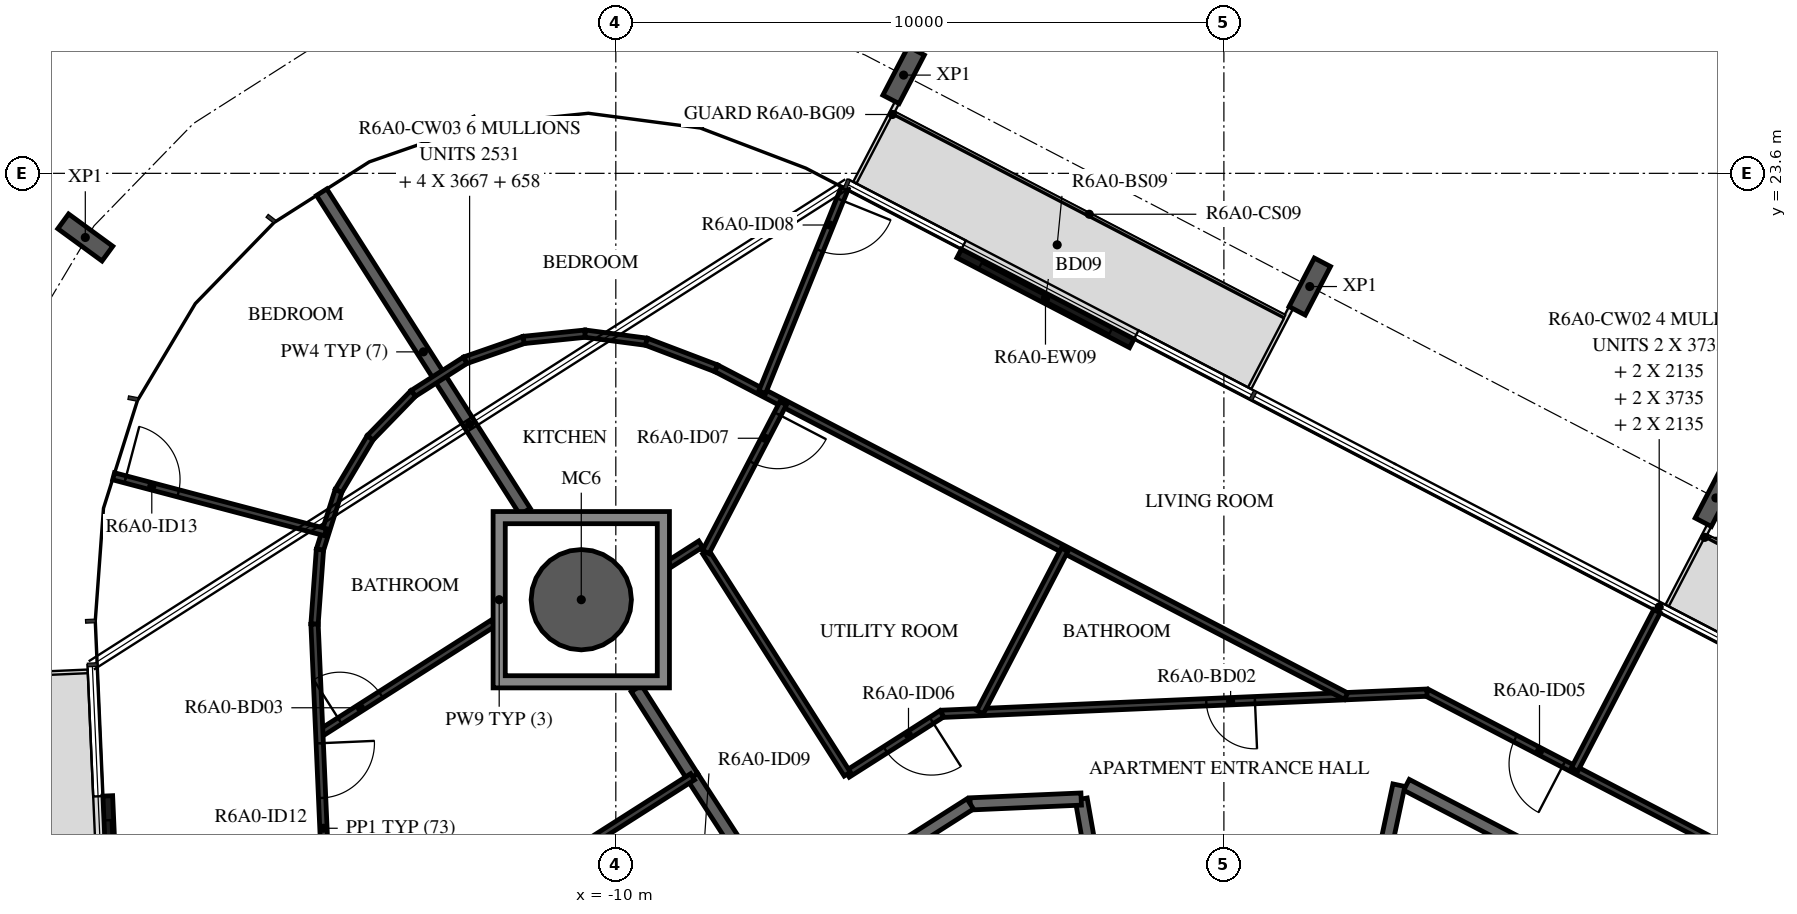
"""IFC4 building model, lengths in metres.
Left out: names, types, materials, properties, quantities, classifications, styles, units other than length and angle.
Written with IfcOpenShell. Run it as: python <this file> out.ifc"""

import sys

from ifc_helpers import new_model, si_unit, direction, frame, frame_2d, origin, origin_2d, place, context, subcontext, project, spatial, polyline, rectangle, hollow_circle, i_section, outline, extrude, element, fill, save


model = new_model("IFC4")
c1 = context("Model", 3, precision=1e-05, world=origin(), true_north=direction((0.0, 1.0)))
c2 = subcontext(c1, "Body", "Model", "MODEL_VIEW")
j1 = project(units=[si_unit("LENGTHUNIT", "METRE"), si_unit("PLANEANGLEUNIT", "RADIAN")], contexts=[c1])
p1 = place(None, origin())
s1 = spatial("IfcSite", under=j1, at=p1, CompositionType="ELEMENT")
p2 = place(p1, origin())
s2 = spatial("IfcBuilding", under=s1, at=p2, CompositionType="ELEMENT")
p3 = place(p2, frame((0.0, 0.0, 233.7)))
s3 = spatial("IfcBuildingStorey", under=s2, at=p3, CompositionType="ELEMENT", Elevation=233.7)
p4 = place(p3, frame((-10.568, 16.588, -0.38), z_axis=(0.0, 0.0, 1.0), x_axis=(1.0, 0.0, 0.0)))
e1 = element("IfcColumn", 1, at=p4, inside=s3, PredefinedType="COLUMN", context=c2, shape_type="SweptSolid", body=[
    extrude(hollow_circle(Radius=0.825, WallThickness=0.04, at=origin_2d()), origin(), (0.0, 0.0, 1.0), 3.5),
])
for number, where, z_axis, x_axis in (
    (2, (8.091, 18.261, -0.38), (0.0, 0.0, 1.0), (0.887, -0.462, 0.0)),
    (3, (1.412, 21.739, -0.38), (0.0, 0.0, 1.0), (0.887, -0.462, 0.0)),
    (4, (-5.267, 25.216, -0.38), (0.0, 0.0, 1.0), (0.887, -0.462, 0.0)),
    (5, (-18.724, 22.545, -0.38), (0.0, 0.0, 1.0), (0.59, 0.808, 0.0)),
):
    element("IfcColumn", number, at=place(p3, frame(where, z_axis=z_axis, x_axis=x_axis)), inside=s3, PredefinedType="COLUMN", context=c2, shape_type="SweptSolid", body=[
        extrude(i_section(OverallWidth=0.3, OverallDepth=0.9, WebThickness=0.019, FlangeThickness=0.035, FilletRadius=0.03, at=origin_2d()), origin(), (0.0, 0.0, 1.0), 3.5),
    ])
p5 = place(p3, frame((-1.515, 20.804, 0.0), z_axis=(0.0, 0.0, 1.0), x_axis=(-0.887014349583, 0.461741858221, 0.0)))
e6 = element("IfcWall", 6, at=p5, inside=s3, PredefinedType="STANDARD", context=c2, shape_type="SweptSolid", body=[
    extrude(rectangle(XDim=3.2, YDim=0.16, at=frame_2d((1.6, 0.0))), origin(), (0.0, 0.0, 1.0), 3.12),
])
p6 = place(p5, frame((0.4, 0.0, 0.0)))
e7 = element("IfcOpeningElement", 7, at=p6, cuts=e6, PredefinedType="OPENING", context=c2, shape_type="SweptSolid", body=[
    extrude(rectangle(XDim=2.4, YDim=2.4, at=frame_2d((1.2, 1.2))), frame((0.0, 0.09, 0.0), z_axis=(0.0, -1.0, 0.0), x_axis=(1.0, 0.0, 0.0)), (0.0, 0.0, 1.0), 0.18),
])
p7 = place(p3, frame((-18.355, 13.362, 0.0), z_axis=(0.0, 0.0, 1.0), x_axis=(0.043639181999, -0.999047357133, 0.0)))
e8 = element("IfcWall", 8, at=p7, inside=s3, PredefinedType="STANDARD", context=c2, shape_type="SweptSolid", body=[
    extrude(rectangle(XDim=3.2, YDim=0.16, at=frame_2d((1.6, 0.0))), origin(), (0.0, 0.0, 1.0), 3.12),
])
p8 = place(p7, frame((0.4, 0.0, 0.0)))
e9 = element("IfcOpeningElement", 9, at=p8, cuts=e8, PredefinedType="OPENING", context=c2, shape_type="SweptSolid", body=[
    extrude(rectangle(XDim=2.4, YDim=2.4, at=frame_2d((1.2, 1.2))), frame((0.0, 0.09, 0.0), z_axis=(0.0, -1.0, 0.0), x_axis=(1.0, 0.0, 0.0)), (0.0, 0.0, 1.0), 0.18),
])
p9 = place(p3, frame((9.372, 10.228, 0.0), z_axis=(0.0, 0.0, 1.0), x_axis=(-0.887005184532, 0.461759464021, 0.0)))
e10 = element("IfcWall", 10, at=p9, inside=s3, PredefinedType="STANDARD", context=c2, shape_type="SweptSolid", body=[
    extrude(rectangle(XDim=7.181, YDim=0.2, at=frame_2d((3.591, 0.0))), origin(), (0.0, 0.0, 1.0), 3.12),
])
p10 = place(p3, frame((2.878, 13.538, 0.0), z_axis=(0.0, 0.0, 1.0), x_axis=(-0.207893604596, -0.978151444904, 0.0)))
e11 = element("IfcWall", 11, at=p10, inside=s3, PredefinedType="STANDARD", context=c2, shape_type="SweptSolid", body=[
    extrude(rectangle(XDim=1.927, YDim=0.2, at=frame_2d((0.963, 0.0))), origin(), (0.0, 0.0, 1.0), 3.12),
])
p11 = place(p3, frame((-2.074, 11.761, 0.0), z_axis=(0.0, 0.0, 1.0), x_axis=(-0.173679082312, 0.984802303189, 0.0)))
e12 = element("IfcWall", 12, at=p11, inside=s3, PredefinedType="STANDARD", context=c2, shape_type="SweptSolid", body=[
    extrude(rectangle(XDim=1.573, YDim=0.2, at=frame_2d((0.787, 0.0))), origin(), (0.0, 0.0, 1.0), 3.12),
])
p12 = place(p3, frame((-2.347, 13.31, 0.0), z_axis=(0.0, 0.0, 1.0), x_axis=(-0.999050095671, -0.043576442492, 0.0)))
e13 = element("IfcWall", 13, at=p12, inside=s3, PredefinedType="STANDARD", context=c2, shape_type="SweptSolid", body=[
    extrude(rectangle(XDim=1.826, YDim=0.2, at=frame_2d((0.913, 0.0))), origin(), (0.0, 0.0, 1.0), 3.12),
])
p13 = place(p3, frame((-4.172, 13.231, 0.0), z_axis=(0.0, 0.0, 1.0), x_axis=(-0.843388394728, -0.537304397561, 0.0)))
e14 = element("IfcWall", 14, at=p13, inside=s3, PredefinedType="STANDARD", context=c2, shape_type="SweptSolid", body=[
    extrude(rectangle(XDim=7.181, YDim=0.2, at=frame_2d((3.59, 0.0))), origin(), (0.0, 0.0, 1.0), 3.12),
])
p14 = place(p3, frame((-8.738, 13.677, 0.0), z_axis=(0.0, 0.0, 1.0), x_axis=(0.54358037296, -0.839357121929, 0.0)))
e15 = element("IfcWall", 15, at=p14, inside=s3, PredefinedType="STANDARD", context=c2, shape_type="SweptSolid", body=[
    extrude(rectangle(XDim=2.83, YDim=0.2, at=frame_2d((1.415, 0.0))), origin(), (0.0, 0.0, 1.0), 3.12),
])
p15 = place(p3, frame((-9.663, 15.129, 0.0), z_axis=(0.0, 0.0, 1.0), x_axis=(0.537205715853, -0.843451254581, 0.0)))
e16 = element("IfcWall", 16, at=p15, inside=s3, PredefinedType="STANDARD", context=c2, shape_type="SweptSolid", body=[
    extrude(rectangle(XDim=1.722, YDim=0.2, at=frame_2d((0.861, 0.0))), origin(), (0.0, 0.0, 1.0), 3.12),
])
p16 = place(p3, frame((-14.837, 23.29, 0.0), z_axis=(0.0, 0.0, 1.0), x_axis=(0.537316863221, -0.843380452998, 0.0)))
e17 = element("IfcWall", 17, at=p16, inside=s3, PredefinedType="STANDARD", context=c2, shape_type="SweptSolid", body=[
    extrude(rectangle(XDim=6.227, YDim=0.2, at=frame_2d((3.113, 0.0))), origin(), (0.0, 0.0, 1.0), 3.12),
])
p17 = place(p3, frame((10.421, 11.373, 0.0), z_axis=(0.0, 0.0, 1.0), x_axis=(-0.887012970857, 0.461744506769, 0.0)))
e18 = element("IfcWall", 18, at=p17, inside=s3, PredefinedType="PARTITIONING", context=c2, shape_type="SweptSolid", body=[
    extrude(rectangle(XDim=7.985, YDim=0.12, at=frame_2d((3.992, 0.0))), origin(), (0.0, 0.0, 1.0), 3.12),
])
p18 = place(p17, frame((5.448, 0.0, 0.0)))
e19 = element("IfcOpeningElement", 19, at=p18, cuts=e18, PredefinedType="OPENING", context=c2, shape_type="SweptSolid", body=[
    extrude(rectangle(XDim=0.9, YDim=2.1, at=frame_2d((0.45, 1.05))), frame((0.0, 0.07, 0.0), z_axis=(0.0, -1.0, 0.0), x_axis=(1.0, 0.0, 0.0)), (0.0, 0.0, 1.0), 0.14),
])
p19 = place(p3, frame((3.339, 15.06, 0.0), z_axis=(0.0, 0.0, 1.0), x_axis=(-0.999047716945, -0.043630943905, 0.0)))
e20 = element("IfcWall", 20, at=p19, inside=s3, PredefinedType="PARTITIONING", context=c2, shape_type="SweptSolid", body=[
    extrude(rectangle(XDim=7.985, YDim=0.12, at=frame_2d((3.992, 0.0))), origin(), (0.0, 0.0, 1.0), 3.12),
])
p20 = place(p19, frame((2.831, 0.0, 0.0)))
e21 = element("IfcOpeningElement", 21, at=p20, cuts=e20, PredefinedType="OPENING", context=c2, shape_type="SweptSolid", body=[
    extrude(rectangle(XDim=0.8, YDim=2.1, at=frame_2d((0.4, 1.05))), frame((0.0, 0.07, 0.0), z_axis=(0.0, -1.0, 0.0), x_axis=(1.0, 0.0, 0.0)), (0.0, 0.0, 1.0), 0.14),
])
p21 = place(p3, frame((-4.639, 14.712, 0.0), z_axis=(0.0, 0.0, 1.0), x_axis=(-0.843361471414, -0.537346655833, 0.0)))
e22 = element("IfcWall", 22, at=p21, inside=s3, PredefinedType="PARTITIONING", context=c2, shape_type="SweptSolid", body=[
    extrude(rectangle(XDim=1.844, YDim=0.12, at=frame_2d((0.922, 0.0))), origin(), (0.0, 0.0, 1.0), 3.12),
])
p22 = place(p21, frame((0.2, 0.0, 0.0)))
e23 = element("IfcOpeningElement", 23, at=p22, cuts=e22, PredefinedType="OPENING", context=c2, shape_type="SweptSolid", body=[
    extrude(rectangle(XDim=0.9, YDim=2.1, at=frame_2d((0.45, 1.05))), frame((0.0, 0.07, 0.0), z_axis=(0.0, -1.0, 0.0), x_axis=(1.0, 0.0, 0.0)), (0.0, 0.0, 1.0), 0.14),
])
p23 = place(p3, frame((-6.194, 13.721, 0.0), z_axis=(0.0, 0.0, 1.0), x_axis=(-0.537316807294, 0.843380488629, 0.0)))
e24 = element("IfcWall", 24, at=p23, inside=s3, PredefinedType="PARTITIONING", context=c2, shape_type="SweptSolid", body=[
    extrude(rectangle(XDim=4.331, YDim=0.12, at=frame_2d((2.165, 0.0))), origin(), (0.0, 0.0, 1.0), 3.12),
])
p24 = place(p3, frame((-8.604, 17.504, 0.0), z_axis=(0.0, 0.0, 1.0), x_axis=(-0.843265746233, -0.537496866251, 0.0)))
e25 = element("IfcWall", 25, at=p24, inside=s3, PredefinedType="PARTITIONING", context=c2, shape_type="SweptSolid", body=[
    extrude(rectangle(XDim=0.61, YDim=0.12, at=frame_2d((0.305, 0.0))), origin(), (0.0, 0.0, 1.0), 3.12),
])
p25 = place(p3, frame((7.122, 16.399, 0.0), z_axis=(0.0, 0.0, 1.0), x_axis=(-0.461763975246, -0.887002836053, 0.0)))
e26 = element("IfcWall", 26, at=p25, inside=s3, PredefinedType="PARTITIONING", context=c2, shape_type="SweptSolid", body=[
    extrude(rectangle(XDim=2.934, YDim=0.12, at=frame_2d((1.467, 0.0))), origin(), (0.0, 0.0, 1.0), 2.73),
])
p26 = place(p3, frame((-8.35, 20.394, 0.0), z_axis=(0.0, 0.0, 1.0), x_axis=(0.887020940825, -0.461729196107, 0.0)))
e27 = element("IfcWall", 27, at=p26, inside=s3, PredefinedType="PARTITIONING", context=c2, shape_type="SweptSolid", body=[
    extrude(rectangle(XDim=11.678, YDim=0.12, at=frame_2d((5.839, 0.0))), origin(), (0.0, 0.0, 1.0), 3.12),
])
p27 = place(p3, frame((-6.237, 23.353, 0.0), z_axis=(0.0, 0.0, 1.0), x_axis=(-0.375089171101, -0.92698873441, 0.0)))
e28 = element("IfcWall", 28, at=p27, inside=s3, PredefinedType="PARTITIONING", context=c2, shape_type="SweptSolid", body=[
    extrude(rectangle(XDim=3.616, YDim=0.12, at=frame_2d((1.808, 0.0))), origin(), (0.0, 0.0, 1.0), 2.73),
])
p28 = place(p27, frame((0.2, 0.0, 0.0)))
e29 = element("IfcOpeningElement", 29, at=p28, cuts=e28, PredefinedType="OPENING", context=c2, shape_type="SweptSolid", body=[
    extrude(rectangle(XDim=0.9, YDim=2.1, at=frame_2d((0.45, 1.05))), frame((0.0, 0.07, 0.0), z_axis=(0.0, -1.0, 0.0), x_axis=(1.0, 0.0, 0.0)), (0.0, 0.0, 1.0), 0.14),
])
p29 = place(p3, frame((-2.619, 17.411, 0.0), z_axis=(0.0, 0.0, 1.0), x_axis=(-0.461743141736, -0.887013681439, 0.0)))
e30 = element("IfcWall", 30, at=p29, inside=s3, PredefinedType="PARTITIONING", context=c2, shape_type="SweptSolid", body=[
    extrude(rectangle(XDim=3.012, YDim=0.12, at=frame_2d((1.506, 0.0))), origin(), (0.0, 0.0, 1.0), 3.12),
])
p30 = place(p3, frame((-7.247, 19.82, 0.0), z_axis=(0.0, 0.0, 1.0), x_axis=(-0.46174004932, -0.887015291218, 0.0)))
e31 = element("IfcWall", 31, at=p30, inside=s3, PredefinedType="PARTITIONING", context=c2, shape_type="SweptSolid", body=[
    extrude(rectangle(XDim=2.759, YDim=0.12, at=frame_2d((1.379, 0.0))), origin(), (0.0, 0.0, 1.0), 3.12),
])
p31 = place(p30, frame((0.2, 0.0, 0.0)))
e32 = element("IfcOpeningElement", 32, at=p31, cuts=e31, PredefinedType="OPENING", context=c2, shape_type="SweptSolid", body=[
    extrude(rectangle(XDim=0.9, YDim=2.1, at=frame_2d((0.45, 1.05))), frame((0.0, 0.07, 0.0), z_axis=(0.0, -1.0, 0.0), x_axis=(1.0, 0.0, 0.0)), (0.0, 0.0, 1.0), 0.14),
])
for number, where, z_axis, x_axis in (
    (33, (-13.332, 19.981, 0.0), (0.0, 0.0, 1.0), (0.843, 0.537, 0.0)),
    (34, (-12.475, 20.527, 0.0), (0.0, 0.0, 1.0), (0.945, 0.328, 0.0)),
):
    element("IfcWall", number, at=place(p3, frame(where, z_axis=z_axis, x_axis=x_axis)), inside=s3, PredefinedType="PARTITIONING", context=c2, shape_type="SweptSolid", body=[
        extrude(rectangle(XDim=1.016, YDim=0.12, at=frame_2d((0.508, 0.0))), origin(), (0.0, 0.0, 1.0), 3.12),
    ])
p32 = place(p3, frame((-11.515, 20.86, 0.0), z_axis=(0.0, 0.0, 1.0), x_axis=(0.994818278641, 0.101669034034, 0.0)))
e35 = element("IfcWall", 35, at=p32, inside=s3, PredefinedType="PARTITIONING", context=c2, shape_type="SweptSolid", body=[
    extrude(rectangle(XDim=1.016, YDim=0.12, at=frame_2d((0.508, 0.0))), origin(), (0.0, 0.0, 1.0), 3.12),
])
p33 = place(p3, frame((-10.504, 20.963, 0.0), z_axis=(0.0, 0.0, 1.0), x_axis=(0.991451023706, -0.13047937612, 0.0)))
e36 = element("IfcWall", 36, at=p33, inside=s3, PredefinedType="PARTITIONING", context=c2, shape_type="SweptSolid", body=[
    extrude(rectangle(XDim=1.016, YDim=0.12, at=frame_2d((0.508, 0.0))), origin(), (0.0, 0.0, 1.0), 3.12),
])
p34 = place(p3, frame((-9.497, 20.831, 0.0), z_axis=(0.0, 0.0, 1.0), x_axis=(0.934575963521, -0.355763641213, 0.0)))
e37 = element("IfcWall", 37, at=p34, inside=s3, PredefinedType="PARTITIONING", context=c2, shape_type="SweptSolid", body=[
    extrude(rectangle(XDim=1.227, YDim=0.12, at=frame_2d((0.614, 0.0))), origin(), (0.0, 0.0, 1.0), 3.12),
])
for number, where, z_axis, x_axis in (
    (38, (-14.865, 17.411, 0.0), (0.0, 0.0, 1.0), (0.301, 0.954, 0.0)),
    (39, (-14.56, 18.38, 0.0), (0.0, 0.0, 1.0), (0.513, 0.859, 0.0)),
    (40, (-14.039, 19.252, 0.0), (0.0, 0.0, 1.0), (0.697, 0.717, 0.0)),
):
    element("IfcWall", number, at=place(p3, frame(where, z_axis=z_axis, x_axis=x_axis)), inside=s3, PredefinedType="PARTITIONING", context=c2, shape_type="SweptSolid", body=[
        extrude(rectangle(XDim=1.016, YDim=0.12, at=frame_2d((0.508, 0.0))), origin(), (0.0, 0.0, 1.0), 3.12),
    ])
p35 = place(p3, frame((-18.26, 18.618, 0.0), z_axis=(0.0, 0.0, 1.0), x_axis=(0.96689176932, -0.25518680691, 0.0)))
e41 = element("IfcWall", 41, at=p35, inside=s3, PredefinedType="PARTITIONING", context=c2, shape_type="SweptSolid", body=[
    extrude(rectangle(XDim=3.604, YDim=0.12, at=frame_2d((1.802, 0.0))), origin(), (0.0, 0.0, 1.0), 3.12),
])
p36 = place(p35, frame((0.2, 0.0, 0.0)))
e42 = element("IfcOpeningElement", 42, at=p36, cuts=e41, PredefinedType="OPENING", context=c2, shape_type="SweptSolid", body=[
    extrude(rectangle(XDim=0.9, YDim=2.1, at=frame_2d((0.45, 1.05))), frame((0.0, 0.07, 0.0), z_axis=(0.0, -1.0, 0.0), x_axis=(1.0, 0.0, 0.0)), (0.0, 0.0, 1.0), 0.14),
])
p37 = place(p3, frame((-14.876, 14.382, 0.0), z_axis=(0.0, 0.0, 1.0), x_axis=(0.843409222082, 0.537271704175, 0.0)))
e43 = element("IfcWall", 43, at=p37, inside=s3, PredefinedType="PARTITIONING", context=c2, shape_type="SweptSolid", body=[
    extrude(rectangle(XDim=3.388, YDim=0.12, at=frame_2d((1.694, 0.0))), origin(), (0.0, 0.0, 1.0), 3.12),
])
p38 = place(p37, frame((0.4, 0.0, 0.0)))
e44 = element("IfcOpeningElement", 44, at=p38, cuts=e43, PredefinedType="OPENING", context=c2, shape_type="SweptSolid", body=[
    extrude(rectangle(XDim=0.8, YDim=2.1, at=frame_2d((0.4, 1.05))), frame((0.0, 0.07, 0.0), z_axis=(0.0, -1.0, 0.0), x_axis=(1.0, 0.0, 0.0)), (0.0, 0.0, 1.0), 0.14),
])
p39 = place(p3, frame((-14.865, 17.411, 0.0), z_axis=(0.0, 0.0, 1.0), x_axis=(-0.072618457011, -0.997359794508, 0.0)))
e45 = element("IfcWall", 45, at=p39, inside=s3, PredefinedType="PARTITIONING", context=c2, shape_type="SweptSolid", body=[
    extrude(rectangle(XDim=1.227, YDim=0.12, at=frame_2d((0.614, 0.0))), origin(), (0.0, 0.0, 1.0), 3.12),
])
p40 = place(p3, frame((-14.955, 16.187, 0.0), z_axis=(0.0, 0.0, 1.0), x_axis=(0.043591713888, -0.999049429448, 0.0)))
e46 = element("IfcWall", 46, at=p40, inside=s3, PredefinedType="PARTITIONING", context=c2, shape_type="SweptSolid", body=[
    extrude(rectangle(XDim=6.721, YDim=0.12, at=frame_2d((3.36, 0.0))), origin(), (0.0, 0.0, 1.0), 3.12),
])
p41 = place(p40, frame((1.961, 0.0, 0.0)))
e47 = element("IfcOpeningElement", 47, at=p41, cuts=e46, PredefinedType="OPENING", context=c2, shape_type="SweptSolid", body=[
    extrude(rectangle(XDim=0.9, YDim=2.1, at=frame_2d((0.45, 1.05))), frame((0.0, 0.07, 0.0), z_axis=(0.0, -1.0, 0.0), x_axis=(1.0, 0.0, 0.0)), (0.0, 0.0, 1.0), 0.14),
])
p42 = place(p3, frame((-14.68, 9.891, 0.0), z_axis=(0.0, 0.0, 1.0), x_axis=(0.843391697183, 0.537299213774, 0.0)))
e48 = element("IfcWall", 48, at=p42, inside=s3, PredefinedType="PARTITIONING", context=c2, shape_type="SweptSolid", body=[
    extrude(rectangle(XDim=7.045, YDim=0.12, at=frame_2d((3.522, 0.0))), origin(), (0.0, 0.0, 1.0), 3.12),
])
p43 = place(p42, frame((0.4, 0.0, 0.0)))
e49 = element("IfcOpeningElement", 49, at=p43, cuts=e48, PredefinedType="OPENING", context=c2, shape_type="SweptSolid", body=[
    extrude(rectangle(XDim=0.9, YDim=2.1, at=frame_2d((0.45, 1.05))), frame((0.0, 0.07, 0.0), z_axis=(0.0, -1.0, 0.0), x_axis=(1.0, 0.0, 0.0)), (0.0, 0.0, 1.0), 0.14),
])
p44 = place(p3, origin())
e50 = element("IfcWall", 50, at=p44, inside=s3, PredefinedType="STANDARD", context=c2, shape_type="SweptSolid", body=[
    extrude(outline(polyline([(-9.118, 18.038), (-9.118, 15.138), (-12.018, 15.138), (-12.018, 18.038), (-9.118, 18.038)]), holes=[polyline([(-11.818, 15.338), (-9.318, 15.338), (-9.318, 17.838), (-11.818, 17.838), (-11.818, 15.338)])]), origin(), (0.0, 0.0, 1.0), 3.12),
])
p45 = place(p6, origin())
e51 = element("IfcDoor", 51, at=p45, inside=s3, OperationType="DOUBLE_DOOR_SLIDING", PredefinedType="DOOR", context=c2, shape_type="SweptSolid", body=[
    extrude(rectangle(XDim=2.4, YDim=2.4, at=frame_2d((1.2, 1.2))), frame((0.0, 0.025, 0.0), z_axis=(0.0, -1.0, 0.0), x_axis=(1.0, 0.0, 0.0)), (0.0, 0.0, 1.0), 0.05),
])
fill(e7, e51)
p46 = place(p8, origin())
e52 = element("IfcDoor", 52, at=p46, inside=s3, OperationType="DOUBLE_DOOR_SLIDING", PredefinedType="DOOR", context=c2, shape_type="SweptSolid", body=[
    extrude(rectangle(XDim=2.4, YDim=2.4, at=frame_2d((1.2, 1.2))), frame((0.0, 0.025, 0.0), z_axis=(0.0, -1.0, 0.0), x_axis=(1.0, 0.0, 0.0)), (0.0, 0.0, 1.0), 0.05),
])
fill(e9, e52)
p47 = place(p18, origin())
e53 = element("IfcDoor", 53, at=p47, inside=s3, OperationType="SINGLE_SWING_RIGHT", PredefinedType="DOOR", context=c2, shape_type="SweptSolid", body=[
    extrude(rectangle(XDim=0.9, YDim=2.1, at=frame_2d((0.45, 1.05))), frame((0.0, 0.025, 0.0), z_axis=(0.0, -1.0, 0.0), x_axis=(1.0, 0.0, 0.0)), (0.0, 0.0, 1.0), 0.05),
])
fill(e19, e53)
p48 = place(p20, origin())
e54 = element("IfcDoor", 54, at=p48, inside=s3, OperationType="SINGLE_SWING_RIGHT", PredefinedType="DOOR", context=c2, shape_type="SweptSolid", body=[
    extrude(rectangle(XDim=0.8, YDim=2.1, at=frame_2d((0.4, 1.05))), frame((0.0, 0.025, 0.0), z_axis=(0.0, -1.0, 0.0), x_axis=(1.0, 0.0, 0.0)), (0.0, 0.0, 1.0), 0.05),
])
fill(e21, e54)
p49 = place(p22, origin())
e55 = element("IfcDoor", 55, at=p49, inside=s3, OperationType="SINGLE_SWING_RIGHT", PredefinedType="DOOR", context=c2, shape_type="SweptSolid", body=[
    extrude(rectangle(XDim=0.9, YDim=2.1, at=frame_2d((0.45, 1.05))), frame((0.0, 0.025, 0.0), z_axis=(0.0, -1.0, 0.0), x_axis=(1.0, 0.0, 0.0)), (0.0, 0.0, 1.0), 0.05),
])
fill(e23, e55)
p50 = place(p31, origin())
e56 = element("IfcDoor", 56, at=p50, inside=s3, OperationType="SINGLE_SWING_RIGHT", PredefinedType="DOOR", context=c2, shape_type="SweptSolid", body=[
    extrude(rectangle(XDim=0.9, YDim=2.1, at=frame_2d((0.45, 1.05))), frame((0.0, 0.025, 0.0), z_axis=(0.0, -1.0, 0.0), x_axis=(1.0, 0.0, 0.0)), (0.0, 0.0, 1.0), 0.05),
])
fill(e32, e56)
p51 = place(p28, origin())
e57 = element("IfcDoor", 57, at=p51, inside=s3, OperationType="SINGLE_SWING_RIGHT", PredefinedType="DOOR", context=c2, shape_type="SweptSolid", body=[
    extrude(rectangle(XDim=0.9, YDim=2.1, at=frame_2d((0.45, 1.05))), frame((0.0, 0.025, 0.0), z_axis=(0.0, -1.0, 0.0), x_axis=(1.0, 0.0, 0.0)), (0.0, 0.0, 1.0), 0.05),
])
fill(e29, e57)
p52 = place(p38, origin())
e58 = element("IfcDoor", 58, at=p52, inside=s3, OperationType="SINGLE_SWING_LEFT", PredefinedType="DOOR", context=c2, shape_type="SweptSolid", body=[
    extrude(rectangle(XDim=0.8, YDim=2.1, at=frame_2d((0.4, 1.05))), frame((0.0, 0.025, 0.0), z_axis=(0.0, -1.0, 0.0), x_axis=(1.0, 0.0, 0.0)), (0.0, 0.0, 1.0), 0.05),
])
fill(e44, e58)
p53 = place(p41, origin())
e59 = element("IfcDoor", 59, at=p53, inside=s3, OperationType="SINGLE_SWING_LEFT", PredefinedType="DOOR", context=c2, shape_type="SweptSolid", body=[
    extrude(rectangle(XDim=0.9, YDim=2.1, at=frame_2d((0.45, 1.05))), frame((0.0, 0.025, 0.0), z_axis=(0.0, -1.0, 0.0), x_axis=(1.0, 0.0, 0.0)), (0.0, 0.0, 1.0), 0.05),
])
fill(e47, e59)
p54 = place(p36, origin())
e60 = element("IfcDoor", 60, at=p54, inside=s3, OperationType="SINGLE_SWING_LEFT", PredefinedType="DOOR", context=c2, shape_type="SweptSolid", body=[
    extrude(rectangle(XDim=0.9, YDim=2.1, at=frame_2d((0.45, 1.05))), frame((0.0, 0.025, 0.0), z_axis=(0.0, -1.0, 0.0), x_axis=(1.0, 0.0, 0.0)), (0.0, 0.0, 1.0), 0.05),
])
fill(e42, e60)
save(model, sys.argv[1])
